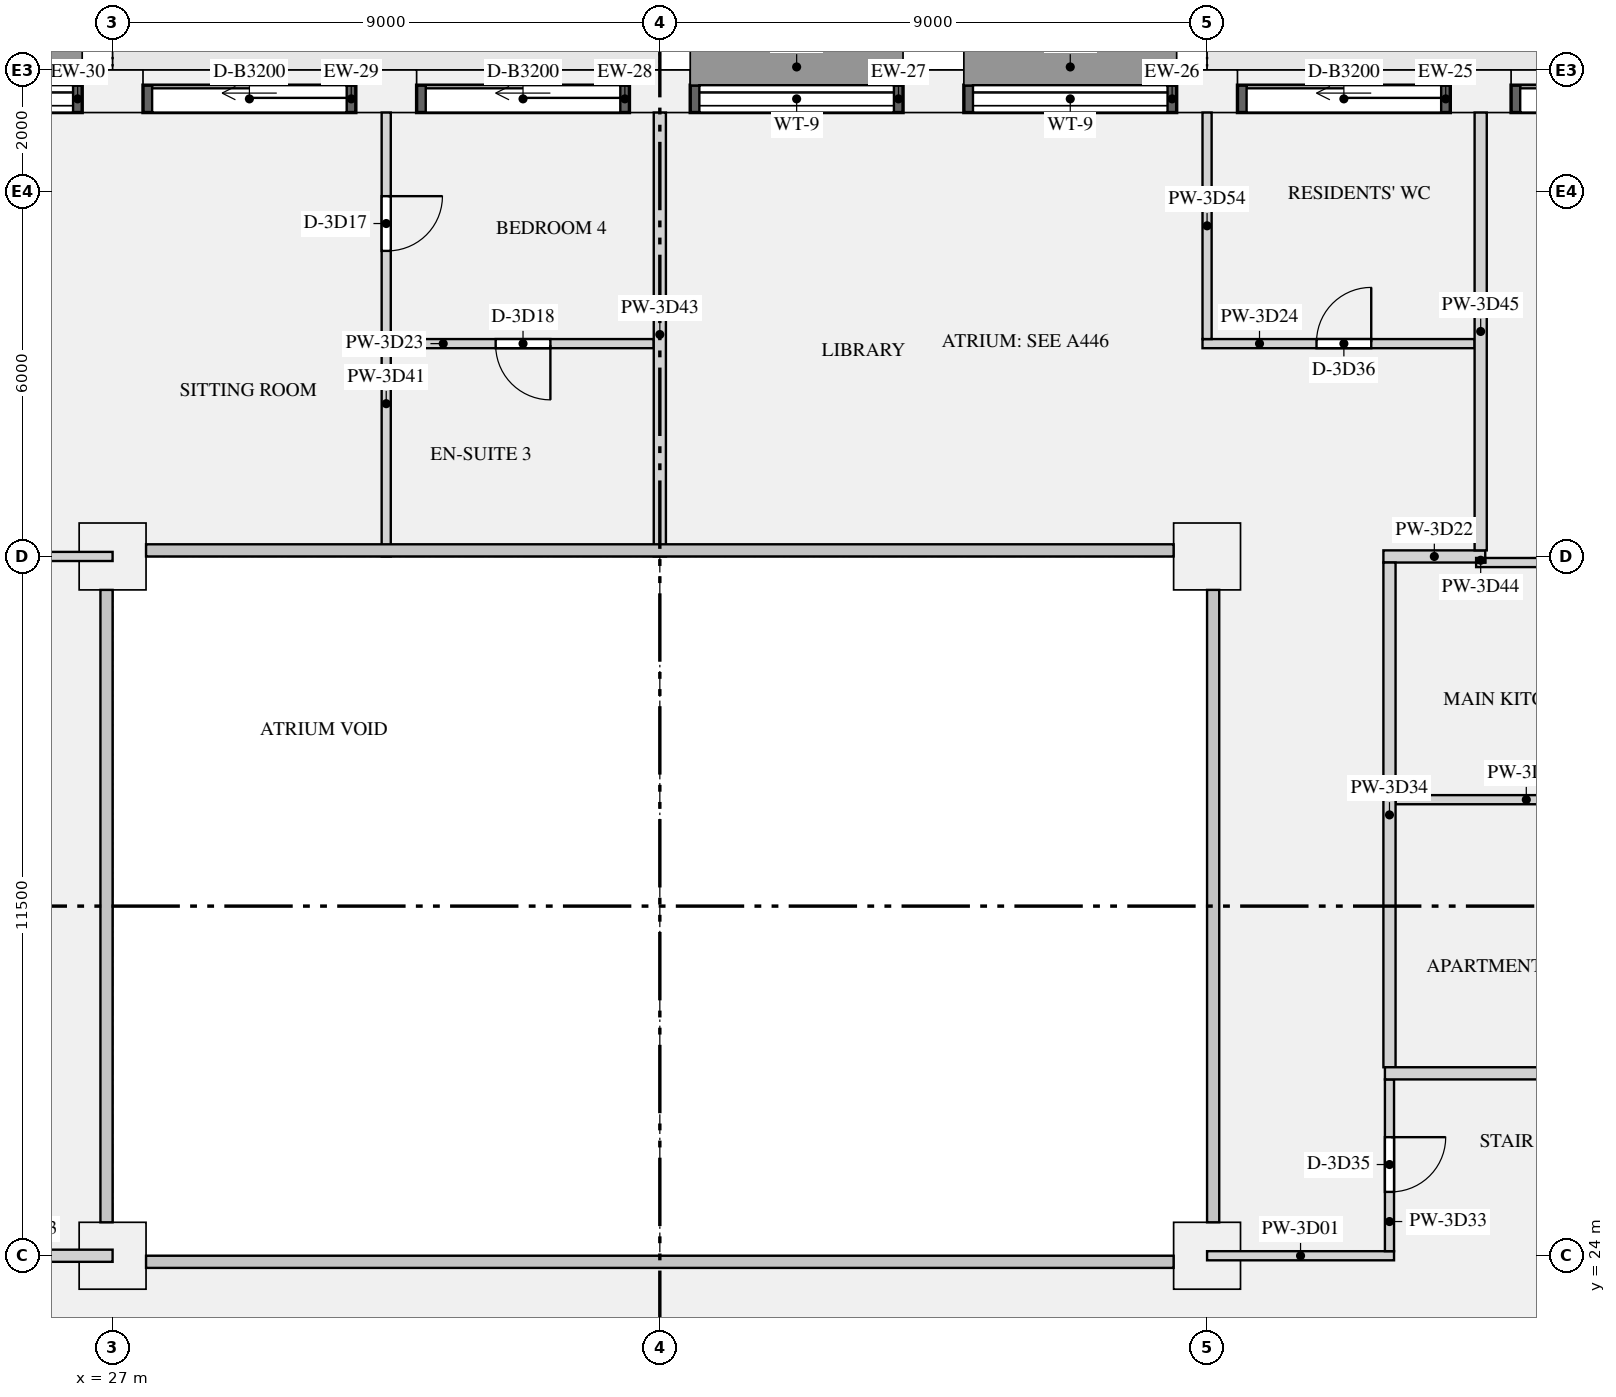
"""IFC4 building model, lengths in metres.
Left out: names, types, materials, properties, quantities, classifications, styles, units other than length and angle.
Written with IfcOpenShell. Run it as: python <this file> out.ifc"""

import sys

from ifc_helpers import new_model, si_unit, direction, frame, frame_2d, origin, origin_2d, place, context, subcontext, project, spatial, rectangle, extrude, element, fill, save


model = new_model("IFC4")
c1 = context("Model", 3, precision=1e-05, world=origin(), true_north=direction((0.0, 1.0)))
c2 = subcontext(c1, "Body", "Model", "MODEL_VIEW")
j1 = project(units=[si_unit("LENGTHUNIT", "METRE"), si_unit("PLANEANGLEUNIT", "RADIAN")], contexts=[c1])
p1 = place(None, origin())
s1 = spatial("IfcSite", under=j1, at=p1, CompositionType="ELEMENT")
p2 = place(p1, origin())
s2 = spatial("IfcBuilding", under=s1, at=p2, CompositionType="ELEMENT")
p3 = place(p2, frame((0.0, 0.0, 166.5)))
s3 = spatial("IfcBuildingStorey", under=s2, at=p3, CompositionType="ELEMENT", Elevation=166.5)
for number, where, z_axis, x_axis in (
    (1, (49.5, 43.15, 0.0), (0.0, 0.0, 1.0), (-1.0, 0.0, 0.0)),
    (2, (45.0, 43.15, 0.0), (0.0, 0.0, 1.0), (-1.0, 0.0, 0.0)),
    (3, (40.5, 43.15, 0.0), (0.0, 0.0, 1.0), (-1.0, 0.0, 0.0)),
    (4, (36.0, 43.15, 0.0), (0.0, 0.0, 1.0), (-1.0, 0.0, 0.0)),
    (5, (31.5, 43.15, 0.0), (0.0, 0.0, 1.0), (-1.0, 0.0, 0.0)),
    (6, (27.0, 43.15, 0.0), (0.0, 0.0, 1.0), (-1.0, 0.0, 0.0)),
):
    element("IfcColumn", number, at=place(p3, frame(where, z_axis=z_axis, x_axis=x_axis)), inside=s3, PredefinedType="USERDEFINED", context=c2, shape_type="SweptSolid", body=[
        extrude(rectangle(XDim=1.0, YDim=0.7, at=origin_2d()), origin(), (0.0, 0.0, 1.0), 3.15),
    ])
for number, where, z_axis, x_axis in (
    (7, (27.0, 24.0, 0.0), (0.0, 0.0, 1.0), (1.0, 0.0, 0.0)),
    (8, (45.0, 24.0, 0.0), (0.0, 0.0, 1.0), (1.0, 0.0, 0.0)),
    (9, (27.0, 35.5, 0.0), (0.0, 0.0, 1.0), (1.0, 0.0, 0.0)),
    (10, (45.0, 35.5, 0.0), (0.0, 0.0, 1.0), (1.0, 0.0, 0.0)),
):
    element("IfcColumn", number, at=place(p3, frame(where, z_axis=z_axis, x_axis=x_axis)), inside=s3, PredefinedType="COLUMN", context=c2, shape_type="SweptSolid", body=[
        extrude(rectangle(XDim=1.1, YDim=1.1, at=origin_2d()), origin(), (0.0, 0.0, 1.0), 3.15),
    ])
p4 = place(p3, frame((53.5, 43.025, 0.0), z_axis=(0.0, 0.0, 1.0), x_axis=(-1.0, 0.0, 0.0)))
e11 = element("IfcWall", 11, at=p4, inside=s3, PredefinedType="SOLIDWALL", context=c2, shape_type="SweptSolid", body=[
    extrude(rectangle(XDim=3.5, YDim=0.45, at=frame_2d((1.75, 0.0))), origin(), (0.0, 0.0, 1.0), 2.83),
])
p5 = place(p4, frame((0.15, 0.0, 0.0)))
e12 = element("IfcOpeningElement", 12, at=p5, cuts=e11, PredefinedType="OPENING", context=c2, shape_type="SweptSolid", body=[
    extrude(rectangle(XDim=3.2, YDim=2.3, at=frame_2d((1.6, 1.15))), frame((0.0, 0.235, 0.0), z_axis=(0.0, -1.0, 0.0), x_axis=(1.0, 0.0, 0.0)), (0.0, 0.0, 1.0), 0.47),
])
p6 = place(p3, frame((49.0, 43.025, 0.0), z_axis=(0.0, 0.0, 1.0), x_axis=(-1.0, 0.0, 0.0)))
e13 = element("IfcWall", 13, at=p6, inside=s3, PredefinedType="SOLIDWALL", context=c2, shape_type="SweptSolid", body=[
    extrude(rectangle(XDim=3.5, YDim=0.45, at=frame_2d((1.75, 0.0))), origin(), (0.0, 0.0, 1.0), 2.83),
])
p7 = place(p6, frame((0.15, 0.0, 0.0)))
e14 = element("IfcOpeningElement", 14, at=p7, cuts=e13, PredefinedType="OPENING", context=c2, shape_type="SweptSolid", body=[
    extrude(rectangle(XDim=3.2, YDim=2.3, at=frame_2d((1.6, 1.15))), frame((0.0, 0.235, 0.0), z_axis=(0.0, -1.0, 0.0), x_axis=(1.0, 0.0, 0.0)), (0.0, 0.0, 1.0), 0.47),
])
p8 = place(p3, frame((44.5, 43.025, 0.9), z_axis=(0.0, 0.0, 1.0), x_axis=(-1.0, 0.0, 0.0)))
e15 = element("IfcWall", 15, at=p8, inside=s3, PredefinedType="SOLIDWALL", context=c2, shape_type="SweptSolid", body=[
    extrude(rectangle(XDim=3.5, YDim=0.45, at=frame_2d((1.75, 0.0))), origin(), (0.0, 0.0, 1.0), 1.93),
])
p9 = place(p8, frame((0.15, 0.0, 0.15)))
e16 = element("IfcOpeningElement", 16, at=p9, cuts=e15, PredefinedType="OPENING", context=c2, shape_type="SweptSolid", body=[
    extrude(rectangle(XDim=3.2, YDim=1.5, at=frame_2d((1.6, 0.75))), frame((0.0, 0.235, 0.0), z_axis=(0.0, -1.0, 0.0), x_axis=(1.0, 0.0, 0.0)), (0.0, 0.0, 1.0), 0.47),
])
p10 = place(p3, frame((40.0, 43.025, 0.9), z_axis=(0.0, 0.0, 1.0), x_axis=(-1.0, 0.0, 0.0)))
e17 = element("IfcWall", 17, at=p10, inside=s3, PredefinedType="SOLIDWALL", context=c2, shape_type="SweptSolid", body=[
    extrude(rectangle(XDim=3.5, YDim=0.45, at=frame_2d((1.75, 0.0))), origin(), (0.0, 0.0, 1.0), 1.93),
])
p11 = place(p10, frame((0.15, 0.0, 0.15)))
e18 = element("IfcOpeningElement", 18, at=p11, cuts=e17, PredefinedType="OPENING", context=c2, shape_type="SweptSolid", body=[
    extrude(rectangle(XDim=3.2, YDim=1.5, at=frame_2d((1.6, 0.75))), frame((0.0, 0.235, 0.0), z_axis=(0.0, -1.0, 0.0), x_axis=(1.0, 0.0, 0.0)), (0.0, 0.0, 1.0), 0.47),
])
p12 = place(p3, frame((35.5, 43.025, 0.0), z_axis=(0.0, 0.0, 1.0), x_axis=(-1.0, 0.0, 0.0)))
e19 = element("IfcWall", 19, at=p12, inside=s3, PredefinedType="SOLIDWALL", context=c2, shape_type="SweptSolid", body=[
    extrude(rectangle(XDim=3.5, YDim=0.45, at=frame_2d((1.75, 0.0))), origin(), (0.0, 0.0, 1.0), 2.83),
])
p13 = place(p12, frame((0.15, 0.0, 0.0)))
e20 = element("IfcOpeningElement", 20, at=p13, cuts=e19, PredefinedType="OPENING", context=c2, shape_type="SweptSolid", body=[
    extrude(rectangle(XDim=3.2, YDim=2.3, at=frame_2d((1.6, 1.15))), frame((0.0, 0.235, 0.0), z_axis=(0.0, -1.0, 0.0), x_axis=(1.0, 0.0, 0.0)), (0.0, 0.0, 1.0), 0.47),
])
p14 = place(p3, frame((31.0, 43.025, 0.0), z_axis=(0.0, 0.0, 1.0), x_axis=(-1.0, 0.0, 0.0)))
e21 = element("IfcWall", 21, at=p14, inside=s3, PredefinedType="SOLIDWALL", context=c2, shape_type="SweptSolid", body=[
    extrude(rectangle(XDim=3.5, YDim=0.45, at=frame_2d((1.75, 0.0))), origin(), (0.0, 0.0, 1.0), 2.83),
])
p15 = place(p14, frame((0.15, 0.0, 0.0)))
e22 = element("IfcOpeningElement", 22, at=p15, cuts=e21, PredefinedType="OPENING", context=c2, shape_type="SweptSolid", body=[
    extrude(rectangle(XDim=3.2, YDim=2.3, at=frame_2d((1.6, 1.15))), frame((0.0, 0.235, 0.0), z_axis=(0.0, -1.0, 0.0), x_axis=(1.0, 0.0, 0.0)), (0.0, 0.0, 1.0), 0.47),
])
p16 = place(p3, frame((26.5, 43.025, 0.9), z_axis=(0.0, 0.0, 1.0), x_axis=(-1.0, 0.0, 0.0)))
e23 = element("IfcWall", 23, at=p16, inside=s3, PredefinedType="SOLIDWALL", context=c2, shape_type="SweptSolid", body=[
    extrude(rectangle(XDim=3.5, YDim=0.45, at=frame_2d((1.75, 0.0))), origin(), (0.0, 0.0, 1.0), 1.93),
])
p17 = place(p16, frame((0.15, 0.0, 0.15)))
e24 = element("IfcOpeningElement", 24, at=p17, cuts=e23, PredefinedType="OPENING", context=c2, shape_type="SweptSolid", body=[
    extrude(rectangle(XDim=3.2, YDim=1.5, at=frame_2d((1.6, 0.75))), frame((0.0, 0.235, 0.0), z_axis=(0.0, -1.0, 0.0), x_axis=(1.0, 0.0, 0.0)), (0.0, 0.0, 1.0), 0.47),
])
p18 = place(p3, frame((45.0, 24.0, 0.0), z_axis=(0.0, 0.0, 1.0), x_axis=(1.0, 0.0, 0.0)))
e25 = element("IfcWall", 25, at=p18, inside=s3, PredefinedType="PARTITIONING", context=c2, shape_type="SweptSolid", body=[
    extrude(rectangle(XDim=3.075, YDim=0.15, at=frame_2d((1.538, 0.0))), origin(), (0.0, 0.0, 1.0), 2.83),
])
p19 = place(p3, frame((23.9, 24.0, 0.0), z_axis=(0.0, 0.0, 1.0), x_axis=(1.0, 0.0, 0.0)))
e26 = element("IfcWall", 26, at=p19, inside=s3, PredefinedType="PARTITIONING", context=c2, shape_type="SweptSolid", body=[
    extrude(rectangle(XDim=3.1, YDim=0.2, at=frame_2d((1.55, 0.0))), origin(), (0.0, 0.0, 1.0), 2.83),
])
p20 = place(p3, frame((47.925, 27.0, 0.0), z_axis=(0.0, 0.0, 1.0), x_axis=(1.0, 0.0, 0.0)))
e27 = element("IfcWall", 27, at=p20, inside=s3, PredefinedType="PARTITIONING", context=c2, shape_type="SweptSolid", body=[
    extrude(rectangle(XDim=6.975, YDim=0.2, at=frame_2d((3.487, 0.0))), origin(), (0.0, 0.0, 1.0), 2.83),
])
p21 = place(p20, frame((2.525, 0.0, 0.0)))
e28 = element("IfcOpeningElement", 28, at=p21, cuts=e27, PredefinedType="OPENING", context=c2, shape_type="SweptSolid", body=[
    extrude(rectangle(XDim=1.1, YDim=2.1, at=frame_2d((0.55, 1.05))), frame((0.0, 0.11, 0.0), z_axis=(0.0, -1.0, 0.0), x_axis=(1.0, 0.0, 0.0)), (0.0, 0.0, 1.0), 0.22),
])
p22 = place(p3, frame((49.425, 35.4, 0.0), z_axis=(0.0, 0.0, 1.0), x_axis=(1.0, 0.0, 0.0)))
e29 = element("IfcWall", 29, at=p22, inside=s3, PredefinedType="PARTITIONING", context=c2, shape_type="SweptSolid", body=[
    extrude(rectangle(XDim=6.775, YDim=0.15, at=frame_2d((3.387, 0.0))), origin(), (0.0, 0.0, 1.0), 2.83),
])
p23 = place(p22, frame((1.6, 0.0, 0.0)))
e30 = element("IfcOpeningElement", 30, at=p23, cuts=e29, PredefinedType="OPENING", context=c2, shape_type="SweptSolid", body=[
    extrude(rectangle(XDim=0.9, YDim=2.1, at=frame_2d((0.45, 1.05))), frame((0.0, 0.085, 0.0), z_axis=(0.0, -1.0, 0.0), x_axis=(1.0, 0.0, 0.0)), (0.0, 0.0, 1.0), 0.17),
])
p24 = place(p3, frame((22.575, 35.5, 0.0), z_axis=(0.0, 0.0, 1.0), x_axis=(1.0, 0.0, 0.0)))
e31 = element("IfcWall", 31, at=p24, inside=s3, PredefinedType="PARTITIONING", context=c2, shape_type="SweptSolid", body=[
    extrude(rectangle(XDim=4.425, YDim=0.15, at=frame_2d((2.212, 0.0))), origin(), (0.0, 0.0, 1.0), 2.83),
])
p25 = place(p24, frame((2.2, 0.0, 0.0)))
e32 = element("IfcOpeningElement", 32, at=p25, cuts=e31, PredefinedType="OPENING", context=c2, shape_type="SweptSolid", body=[
    extrude(rectangle(XDim=0.9, YDim=2.1, at=frame_2d((0.45, 1.05))), frame((0.0, 0.085, 0.0), z_axis=(0.0, -1.0, 0.0), x_axis=(1.0, 0.0, 0.0)), (0.0, 0.0, 1.0), 0.17),
])
p26 = place(p3, frame((47.9, 35.5, 0.0), z_axis=(0.0, 0.0, 1.0), x_axis=(1.0, 0.0, 0.0)))
e33 = element("IfcWall", 33, at=p26, inside=s3, PredefinedType="PARTITIONING", context=c2, shape_type="SweptSolid", body=[
    extrude(rectangle(XDim=1.675, YDim=0.2, at=frame_2d((0.837, 0.0))), origin(), (0.0, 0.0, 1.0), 2.83),
])
p27 = place(p3, frame((31.575, 39.0, 0.0), z_axis=(0.0, 0.0, 1.0), x_axis=(1.0, 0.0, 0.0)))
e34 = element("IfcWall", 34, at=p27, inside=s3, PredefinedType="PARTITIONING", context=c2, shape_type="SweptSolid", body=[
    extrude(rectangle(XDim=4.325, YDim=0.15, at=frame_2d((2.163, 0.0))), origin(), (0.0, 0.0, 1.0), 2.83),
])
p28 = place(p27, frame((1.725, 0.0, 0.0)))
e35 = element("IfcOpeningElement", 35, at=p28, cuts=e34, PredefinedType="OPENING", context=c2, shape_type="SweptSolid", body=[
    extrude(rectangle(XDim=0.9, YDim=2.1, at=frame_2d((0.45, 1.05))), frame((0.0, 0.085, 0.0), z_axis=(0.0, -1.0, 0.0), x_axis=(1.0, 0.0, 0.0)), (0.0, 0.0, 1.0), 0.17),
])
p29 = place(p3, frame((44.925, 39.0, 0.0), z_axis=(0.0, 0.0, 1.0), x_axis=(1.0, 0.0, 0.0)))
e36 = element("IfcWall", 36, at=p29, inside=s3, PredefinedType="PARTITIONING", context=c2, shape_type="SweptSolid", body=[
    extrude(rectangle(XDim=4.475, YDim=0.15, at=frame_2d((2.237, 0.0))), origin(), (0.0, 0.0, 1.0), 2.83),
])
p30 = place(p29, frame((1.875, 0.0, 0.0)))
e37 = element("IfcOpeningElement", 37, at=p30, cuts=e36, PredefinedType="OPENING", context=c2, shape_type="SweptSolid", body=[
    extrude(rectangle(XDim=0.9, YDim=2.1, at=frame_2d((0.45, 1.05))), frame((0.0, 0.085, 0.0), z_axis=(0.0, -1.0, 0.0), x_axis=(1.0, 0.0, 0.0)), (0.0, 0.0, 1.0), 0.17),
])
p31 = place(p3, frame((48.1, 31.5, 0.0), z_axis=(0.0, 0.0, 1.0), x_axis=(1.0, 0.0, 0.0)))
e38 = element("IfcWall", 38, at=p31, inside=s3, PredefinedType="PARTITIONING", context=c2, shape_type="SweptSolid", body=[
    extrude(rectangle(XDim=8.1, YDim=0.15, at=frame_2d((4.05, 0.0))), origin(), (0.0, 0.0, 1.0), 2.83),
])
p32 = place(p31, frame((4.3, 0.0, 0.0)))
e39 = element("IfcOpeningElement", 39, at=p32, cuts=e38, PredefinedType="OPENING", context=c2, shape_type="SweptSolid", body=[
    extrude(rectangle(XDim=0.9, YDim=2.1, at=frame_2d((0.45, 1.05))), frame((0.0, 0.085, 0.0), z_axis=(0.0, -1.0, 0.0), x_axis=(1.0, 0.0, 0.0)), (0.0, 0.0, 1.0), 0.17),
])
p33 = place(p3, frame((48.0, 24.075, 0.0), z_axis=(0.0, 0.0, 1.0), x_axis=(0.0, 1.0, 0.0)))
e40 = element("IfcWall", 40, at=p33, inside=s3, PredefinedType="PARTITIONING", context=c2, shape_type="SweptSolid", body=[
    extrude(rectangle(XDim=2.825, YDim=0.15, at=frame_2d((1.413, 0.0))), origin(), (0.0, 0.0, 1.0), 2.83),
])
p34 = place(p33, frame((0.975, 0.0, 0.0)))
e41 = element("IfcOpeningElement", 41, at=p34, cuts=e40, PredefinedType="OPENING", context=c2, shape_type="SweptSolid", body=[
    extrude(rectangle(XDim=0.9, YDim=2.1, at=frame_2d((0.45, 1.05))), frame((0.0, 0.085, 0.0), z_axis=(0.0, -1.0, 0.0), x_axis=(1.0, 0.0, 0.0)), (0.0, 0.0, 1.0), 0.17),
])
p35 = place(p3, frame((48.0, 27.1, 0.0), z_axis=(0.0, 0.0, 1.0), x_axis=(0.0, 1.0, 0.0)))
e42 = element("IfcWall", 42, at=p35, inside=s3, PredefinedType="PARTITIONING", context=c2, shape_type="SweptSolid", body=[
    extrude(rectangle(XDim=8.3, YDim=0.2, at=frame_2d((4.15, 0.0))), origin(), (0.0, 0.0, 1.0), 2.83),
])
p36 = place(p3, frame((31.5, 35.5, 0.0), z_axis=(0.0, 0.0, 1.0), x_axis=(0.0, 1.0, 0.0)))
e43 = element("IfcWall", 43, at=p36, inside=s3, PredefinedType="PARTITIONING", context=c2, shape_type="SweptSolid", body=[
    extrude(rectangle(XDim=7.3, YDim=0.15, at=frame_2d((3.65, 0.0))), origin(), (0.0, 0.0, 1.0), 2.83),
])
p37 = place(p36, frame((5.025, 0.0, 0.0)))
e44 = element("IfcOpeningElement", 44, at=p37, cuts=e43, PredefinedType="OPENING", context=c2, shape_type="SweptSolid", body=[
    extrude(rectangle(XDim=0.9, YDim=2.1, at=frame_2d((0.45, 1.05))), frame((0.0, 0.085, 0.0), z_axis=(0.0, -1.0, 0.0), x_axis=(1.0, 0.0, 0.0)), (0.0, 0.0, 1.0), 0.17),
])
p38 = place(p3, frame((36.0, 35.5, 0.0), z_axis=(0.0, 0.0, 1.0), x_axis=(0.0, 1.0, 0.0)))
e45 = element("IfcWall", 45, at=p38, inside=s3, PredefinedType="PARTITIONING", context=c2, shape_type="SweptSolid", body=[
    extrude(rectangle(XDim=7.3, YDim=0.2, at=frame_2d((3.65, 0.0))), origin(), (0.0, 0.0, 1.0), 2.83),
])
p39 = place(p3, frame((49.5, 35.4, 0.0), z_axis=(0.0, 0.0, 1.0), x_axis=(0.0, 1.0, 0.0)))
e46 = element("IfcWall", 46, at=p39, inside=s3, PredefinedType="PARTITIONING", context=c2, shape_type="SweptSolid", body=[
    extrude(rectangle(XDim=0.075, YDim=0.15, at=frame_2d((0.038, 0.0))), origin(), (0.0, 0.0, 1.0), 2.83),
])
p40 = place(p3, frame((49.5, 35.6, 0.0), z_axis=(0.0, 0.0, 1.0), x_axis=(0.0, 1.0, 0.0)))
e47 = element("IfcWall", 47, at=p40, inside=s3, PredefinedType="PARTITIONING", context=c2, shape_type="SweptSolid", body=[
    extrude(rectangle(XDim=7.2, YDim=0.2, at=frame_2d((3.6, 0.0))), origin(), (0.0, 0.0, 1.0), 2.83),
])
p41 = place(p3, frame((45.0, 39.075, 0.0), z_axis=(0.0, 0.0, 1.0), x_axis=(0.0, 1.0, 0.0)))
e48 = element("IfcWall", 48, at=p41, inside=s3, PredefinedType="PARTITIONING", context=c2, shape_type="SweptSolid", body=[
    extrude(rectangle(XDim=3.725, YDim=0.15, at=frame_2d((1.863, 0.0))), origin(), (0.0, 0.0, 1.0), 2.83),
])
p42 = place(p5, origin())
e49 = element("IfcDoor", 49, at=p42, inside=s3, OperationType="SLIDING_TO_LEFT", PredefinedType="DOOR", context=c2, shape_type="SweptSolid", body=[
    extrude(rectangle(XDim=3.2, YDim=2.3, at=frame_2d((1.6, 1.15))), frame((0.0, -0.07, 0.0), z_axis=(0.0, -1.0, 0.0), x_axis=(1.0, 0.0, 0.0)), (0.0, 0.0, 1.0), 0.05),
])
fill(e12, e49)
p43 = place(p7, origin())
e50 = element("IfcDoor", 50, at=p43, inside=s3, OperationType="SLIDING_TO_LEFT", PredefinedType="DOOR", context=c2, shape_type="SweptSolid", body=[
    extrude(rectangle(XDim=3.2, YDim=2.3, at=frame_2d((1.6, 1.15))), frame((0.0, -0.07, 0.0), z_axis=(0.0, -1.0, 0.0), x_axis=(1.0, 0.0, 0.0)), (0.0, 0.0, 1.0), 0.05),
])
fill(e14, e50)
p44 = place(p9, origin())
e51 = element("IfcWindow", 51, at=p44, inside=s3, PartitioningType="SINGLE_PANEL", PredefinedType="WINDOW", context=c2, shape_type="SweptSolid", body=[
    extrude(rectangle(XDim=3.2, YDim=1.5, at=frame_2d((1.6, 0.75))), frame((0.0, -0.065, 0.0), z_axis=(0.0, -1.0, 0.0), x_axis=(1.0, 0.0, 0.0)), (0.0, 0.0, 1.0), 0.06),
])
fill(e16, e51)
p45 = place(p11, origin())
e52 = element("IfcWindow", 52, at=p45, inside=s3, PartitioningType="SINGLE_PANEL", PredefinedType="WINDOW", context=c2, shape_type="SweptSolid", body=[
    extrude(rectangle(XDim=3.2, YDim=1.5, at=frame_2d((1.6, 0.75))), frame((0.0, -0.065, 0.0), z_axis=(0.0, -1.0, 0.0), x_axis=(1.0, 0.0, 0.0)), (0.0, 0.0, 1.0), 0.06),
])
fill(e18, e52)
p46 = place(p13, origin())
e53 = element("IfcDoor", 53, at=p46, inside=s3, OperationType="SLIDING_TO_LEFT", PredefinedType="DOOR", context=c2, shape_type="SweptSolid", body=[
    extrude(rectangle(XDim=3.2, YDim=2.3, at=frame_2d((1.6, 1.15))), frame((0.0, -0.07, 0.0), z_axis=(0.0, -1.0, 0.0), x_axis=(1.0, 0.0, 0.0)), (0.0, 0.0, 1.0), 0.05),
])
fill(e20, e53)
p47 = place(p15, origin())
e54 = element("IfcDoor", 54, at=p47, inside=s3, OperationType="SLIDING_TO_LEFT", PredefinedType="DOOR", context=c2, shape_type="SweptSolid", body=[
    extrude(rectangle(XDim=3.2, YDim=2.3, at=frame_2d((1.6, 1.15))), frame((0.0, -0.07, 0.0), z_axis=(0.0, -1.0, 0.0), x_axis=(1.0, 0.0, 0.0)), (0.0, 0.0, 1.0), 0.05),
])
fill(e22, e54)
p48 = place(p17, origin())
e55 = element("IfcWindow", 55, at=p48, inside=s3, PartitioningType="SINGLE_PANEL", PredefinedType="WINDOW", context=c2, shape_type="SweptSolid", body=[
    extrude(rectangle(XDim=3.2, YDim=1.5, at=frame_2d((1.6, 0.75))), frame((0.0, -0.065, 0.0), z_axis=(0.0, -1.0, 0.0), x_axis=(1.0, 0.0, 0.0)), (0.0, 0.0, 1.0), 0.06),
])
fill(e24, e55)
p49 = place(p37, frame((0.9, 0.0, 0.0), z_axis=(0.0, 0.0, 1.0), x_axis=(-1.0, 0.0, 0.0)))
e56 = element("IfcDoor", 56, at=p49, inside=s3, OperationType="SINGLE_SWING_LEFT", PredefinedType="DOOR", context=c2, shape_type="SweptSolid", body=[
    extrude(rectangle(XDim=0.9, YDim=2.1, at=frame_2d((0.45, 1.05))), frame((0.0, 0.025, 0.0), z_axis=(0.0, -1.0, 0.0), x_axis=(1.0, 0.0, 0.0)), (0.0, 0.0, 1.0), 0.05),
])
fill(e44, e56)
p50 = place(p28, frame((0.9, 0.0, 0.0), z_axis=(0.0, 0.0, 1.0), x_axis=(-1.0, 0.0, 0.0)))
e57 = element("IfcDoor", 57, at=p50, inside=s3, OperationType="SINGLE_SWING_LEFT", PredefinedType="DOOR", context=c2, shape_type="SweptSolid", body=[
    extrude(rectangle(XDim=0.9, YDim=2.1, at=frame_2d((0.45, 1.05))), frame((0.0, 0.025, 0.0), z_axis=(0.0, -1.0, 0.0), x_axis=(1.0, 0.0, 0.0)), (0.0, 0.0, 1.0), 0.05),
])
fill(e35, e57)
p51 = place(p34, frame((0.9, 0.0, 0.0), z_axis=(0.0, 0.0, 1.0), x_axis=(-1.0, 0.0, 0.0)))
e58 = element("IfcDoor", 58, at=p51, inside=s3, OperationType="SINGLE_SWING_LEFT", PredefinedType="DOOR", context=c2, shape_type="SweptSolid", body=[
    extrude(rectangle(XDim=0.9, YDim=2.1, at=frame_2d((0.45, 1.05))), frame((0.0, 0.025, 0.0), z_axis=(0.0, -1.0, 0.0), x_axis=(1.0, 0.0, 0.0)), (0.0, 0.0, 1.0), 0.05),
])
fill(e41, e58)
p52 = place(p30, origin())
e59 = element("IfcDoor", 59, at=p52, inside=s3, OperationType="SINGLE_SWING_RIGHT", PredefinedType="DOOR", context=c2, shape_type="SweptSolid", body=[
    extrude(rectangle(XDim=0.9, YDim=2.1, at=frame_2d((0.45, 1.05))), frame((0.0, 0.025, 0.0), z_axis=(0.0, -1.0, 0.0), x_axis=(1.0, 0.0, 0.0)), (0.0, 0.0, 1.0), 0.05),
])
fill(e37, e59)
save(model, sys.argv[1])
